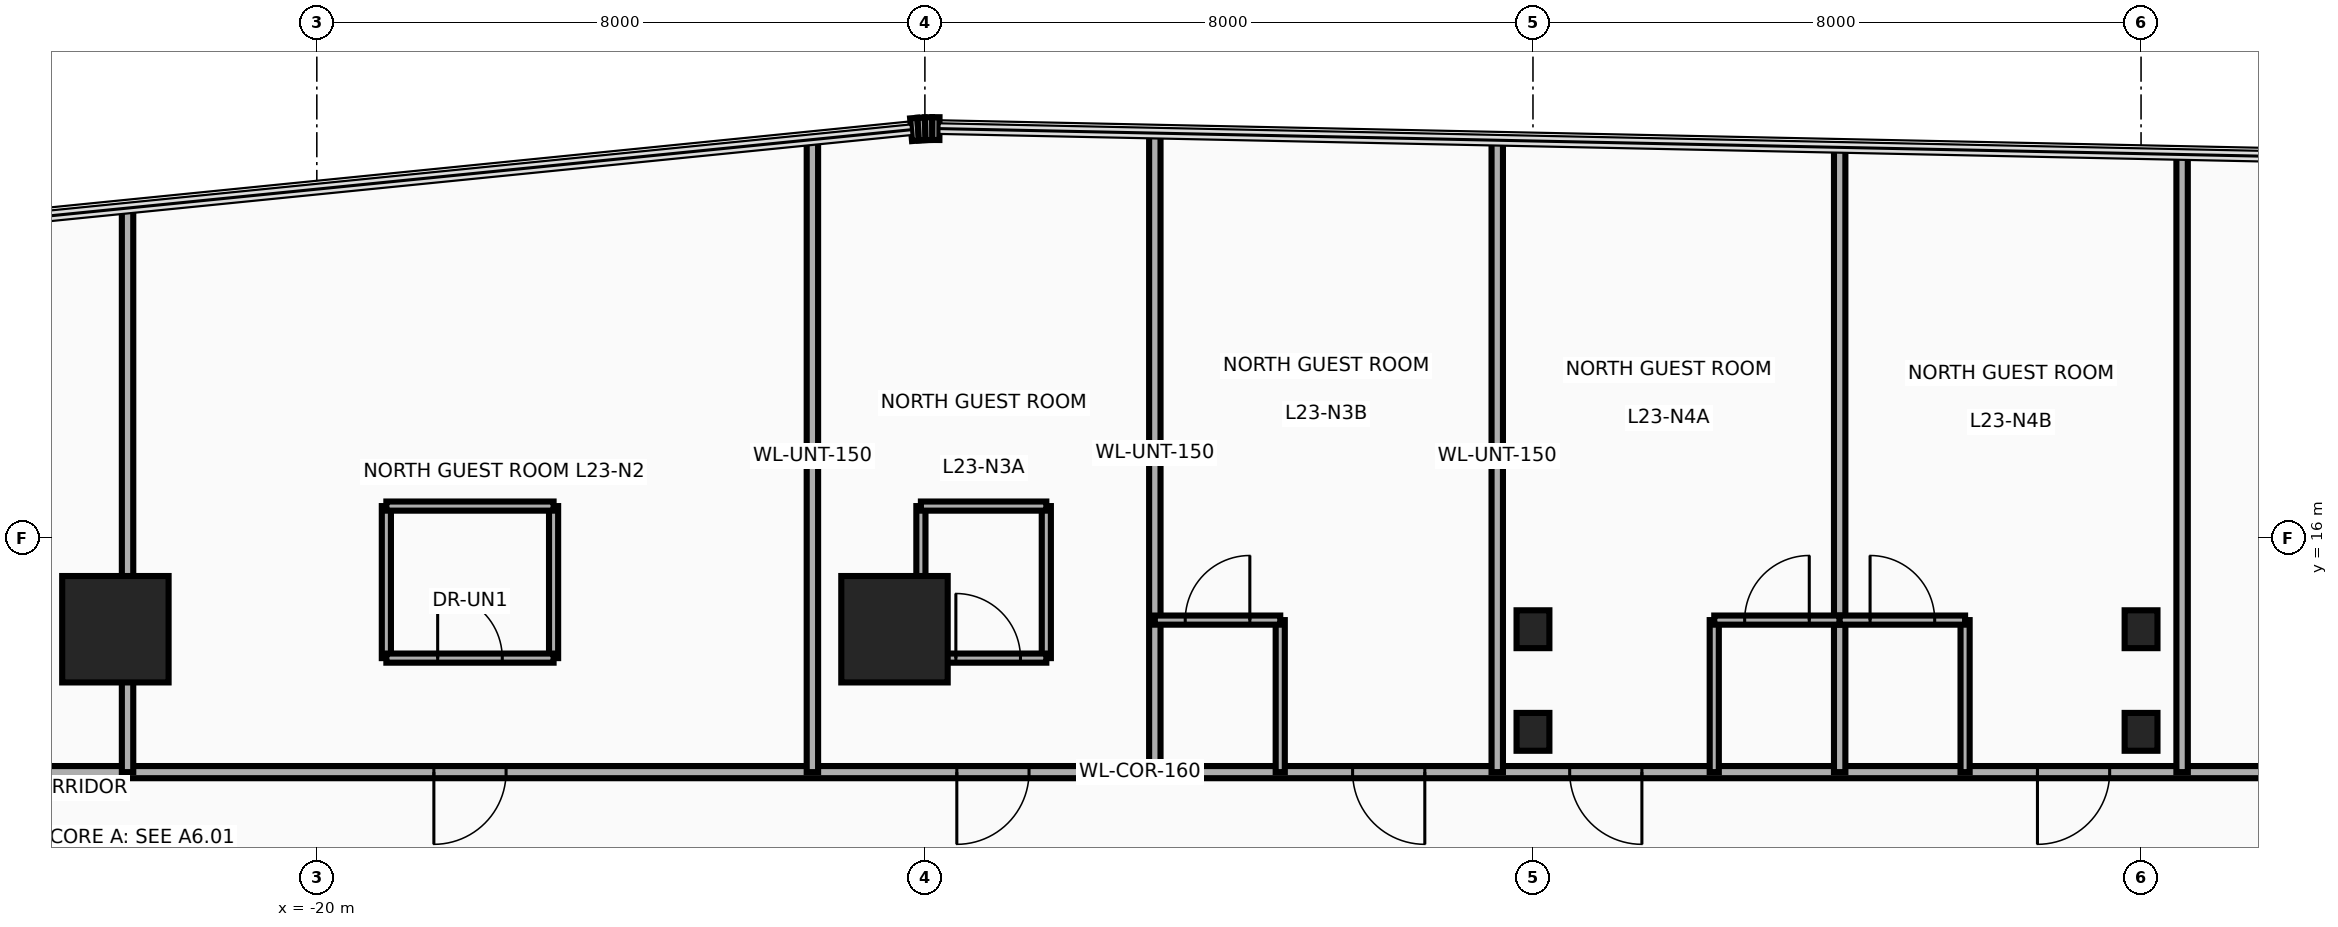
"""IFC4 building model, lengths in metres.
Left out: names, types, materials, properties, quantities, classifications, styles, units other than length and angle.
Written with IfcOpenShell. Run it as: python <this file> out.ifc"""

import sys

from ifc_helpers import new_model, si_unit, direction, frame, frame_2d, origin, origin_2d, place, context, subcontext, project, spatial, rectangle, i_section, extrude, source, transform, mapped, element, fill, save


model = new_model("IFC4")
c1 = context("Model", 3, precision=1e-05, world=origin(), true_north=direction((0.0, 1.0)))
c2 = subcontext(c1, "Body", "Model", "MODEL_VIEW")
j1 = project(units=[si_unit("LENGTHUNIT", "METRE"), si_unit("PLANEANGLEUNIT", "RADIAN")], contexts=[c1])
p1 = place(None, origin())
s1 = spatial("IfcSite", under=j1, at=p1, CompositionType="ELEMENT")
p2 = place(p1, origin())
s2 = spatial("IfcBuilding", under=s1, at=p2, CompositionType="ELEMENT")
p3 = place(p2, frame((0.0, 0.0, 92.6)))
s3 = spatial("IfcBuildingStorey", under=s2, at=p3, CompositionType="ELEMENT", Elevation=92.6)
m1 = source(origin(), c2, "Body", "SweptSolid", [
    extrude(rectangle(XDim=1.4, YDim=1.4, at=origin_2d()), origin(), (0.0, 0.0, 1.0), 3.7),
])
for number, where, z_axis, x_axis in (
    (1, (-22.65, 14.8, 0.0), (0.0, 0.0, 1.0), (1.0, 0.0, 0.0)),
    (2, (-12.4, 14.8, 0.0), (0.0, 0.0, 1.0), (1.0, 0.0, 0.0)),
):
    element("IfcColumn", number, at=place(p3, frame(where, z_axis=z_axis, x_axis=x_axis)), inside=s3, PredefinedType="COLUMN", context=c2, shape_type="MappedRepresentation", body=[
        mapped(m1, transform((0.0, 0.0, 0.0), x_axis=(1.0, 0.0, 0.0), y_axis=(0.0, 1.0, 0.0), z_axis=(0.0, 0.0, 1.0), scale=1.0)),
    ])
m2 = source(origin(), c2, "Body", "SweptSolid", [
    extrude(i_section(OverallWidth=0.432, OverallDepth=0.498, WebThickness=0.056, FlangeThickness=0.089, at=origin_2d()), origin(), (0.0, 0.0, 1.0), 3.7),
])
for number, where, z_axis, x_axis in (
    (3, (-4.0, 13.45, 0.0), (0.0, 0.0, 1.0), (1.0, 0.0, 0.0)),
    (4, (-4.0, 14.8, 0.0), (0.0, 0.0, 1.0), (1.0, 0.0, 0.0)),
    (5, (4.0, 13.45, 0.0), (0.0, 0.0, 1.0), (1.0, 0.0, 0.0)),
    (6, (4.0, 14.8, 0.0), (0.0, 0.0, 1.0), (1.0, 0.0, 0.0)),
):
    element("IfcColumn", number, at=place(p3, frame(where, z_axis=z_axis, x_axis=x_axis)), inside=s3, PredefinedType="COLUMN", context=c2, shape_type="MappedRepresentation", body=[
        mapped(m2, transform((0.0, 0.0, 0.0), x_axis=(1.0, 0.0, 0.0), y_axis=(0.0, 1.0, 0.0), z_axis=(0.0, 0.0, 1.0), scale=1.0)),
    ])
p4 = place(p3, frame((-12.182, 21.371, 0.0), z_axis=(0.0, 0.0, 1.0), x_axis=(0.996527790842, 0.08326080759, 0.0)))
e7 = element("IfcWall", 7, at=p4, inside=s3, PredefinedType="SOLIDWALL", context=c2, shape_type="SweptSolid", body=[
    extrude(rectangle(XDim=0.094, YDim=0.3, at=frame_2d((0.047, 0.0))), origin(), (0.0, 0.0, 1.0), 3.46),
])
p5 = place(p3, frame((-12.088, 21.379, 0.0), z_axis=(0.0, 0.0, 1.0), x_axis=(0.998476480444, 0.055178963393, 0.0)))
e8 = element("IfcWall", 8, at=p5, inside=s3, PredefinedType="SOLIDWALL", context=c2, shape_type="SweptSolid", body=[
    extrude(rectangle(XDim=0.093, YDim=0.3, at=frame_2d((0.046, 0.0))), origin(), (0.0, 0.0, 1.0), 3.46),
])
p6 = place(p3, frame((-11.996, 21.384, 0.0), z_axis=(0.0, 0.0, 1.0), x_axis=(0.999722573757, 0.023553673204, 0.0)))
e9 = element("IfcWall", 9, at=p6, inside=s3, PredefinedType="SOLIDWALL", context=c2, shape_type="SweptSolid", body=[
    extrude(rectangle(XDim=0.093, YDim=0.3, at=frame_2d((0.047, 0.0))), origin(), (0.0, 0.0, 1.0), 3.46),
])
p7 = place(p3, frame((-11.902, 21.386, 0.0), z_axis=(0.0, 0.0, 1.0), x_axis=(0.999986507273, -0.005194735103, 0.0)))
e10 = element("IfcWall", 10, at=p7, inside=s3, PredefinedType="SOLIDWALL", context=c2, shape_type="SweptSolid", body=[
    extrude(rectangle(XDim=0.094, YDim=0.3, at=frame_2d((0.047, 0.0))), origin(), (0.0, 0.0, 1.0), 3.46),
])
p8 = place(p3, frame((-31.89, 12.92, 0.0), z_axis=(0.0, 0.0, 1.0), x_axis=(1.0, 0.0, 0.0)))
e11 = element("IfcWall", 11, at=p8, inside=s3, PredefinedType="PARTITIONING", context=c2, shape_type="SweptSolid", body=[
    extrude(rectangle(XDim=45.44, YDim=0.16, at=frame_2d((22.72, 0.0))), origin(), (0.0, 0.0, 1.0), 2.583),
])
p9 = place(p8, frame((4.225, 0.0, 0.0)))
e12 = element("IfcOpeningElement", 12, at=p9, cuts=e11, PredefinedType="OPENING", context=c2, shape_type="SweptSolid", body=[
    extrude(rectangle(XDim=0.95, YDim=2.15, at=frame_2d((0.475, 1.075))), frame((0.0, 0.095, 0.0), z_axis=(0.0, -1.0, 0.0), x_axis=(1.0, 0.0, 0.0)), (0.0, 0.0, 1.0), 0.19),
])
p10 = place(p8, frame((13.43, 0.0, 0.0)))
e13 = element("IfcOpeningElement", 13, at=p10, cuts=e11, PredefinedType="OPENING", context=c2, shape_type="SweptSolid", body=[
    extrude(rectangle(XDim=0.95, YDim=2.15, at=frame_2d((0.475, 1.075))), frame((0.0, 0.095, 0.0), z_axis=(0.0, -1.0, 0.0), x_axis=(1.0, 0.0, 0.0)), (0.0, 0.0, 1.0), 0.19),
])
p11 = place(p8, frame((20.31, 0.0, 0.0)))
e14 = element("IfcOpeningElement", 14, at=p11, cuts=e11, PredefinedType="OPENING", context=c2, shape_type="SweptSolid", body=[
    extrude(rectangle(XDim=0.95, YDim=2.15, at=frame_2d((0.475, 1.075))), frame((0.0, 0.095, 0.0), z_axis=(0.0, -1.0, 0.0), x_axis=(1.0, 0.0, 0.0)), (0.0, 0.0, 1.0), 0.19),
])
p12 = place(p8, frame((25.517, 0.0, 0.0)))
e15 = element("IfcOpeningElement", 15, at=p12, cuts=e11, PredefinedType="OPENING", context=c2, shape_type="SweptSolid", body=[
    extrude(rectangle(XDim=0.95, YDim=2.15, at=frame_2d((0.475, 1.075))), frame((0.0, 0.095, 0.0), z_axis=(0.0, -1.0, 0.0), x_axis=(1.0, 0.0, 0.0)), (0.0, 0.0, 1.0), 0.19),
])
p13 = place(p8, frame((28.373, 0.0, 0.0)))
e16 = element("IfcOpeningElement", 16, at=p13, cuts=e11, PredefinedType="OPENING", context=c2, shape_type="SweptSolid", body=[
    extrude(rectangle(XDim=0.95, YDim=2.15, at=frame_2d((0.475, 1.075))), frame((0.0, 0.095, 0.0), z_axis=(0.0, -1.0, 0.0), x_axis=(1.0, 0.0, 0.0)), (0.0, 0.0, 1.0), 0.19),
])
p14 = place(p8, frame((34.527, 0.0, 0.0)))
e17 = element("IfcOpeningElement", 17, at=p14, cuts=e11, PredefinedType="OPENING", context=c2, shape_type="SweptSolid", body=[
    extrude(rectangle(XDim=0.95, YDim=2.15, at=frame_2d((0.475, 1.075))), frame((0.0, 0.095, 0.0), z_axis=(0.0, -1.0, 0.0), x_axis=(1.0, 0.0, 0.0)), (0.0, 0.0, 1.0), 0.19),
])
p15 = place(p8, frame((39.36, 0.0, 0.0)))
e18 = element("IfcOpeningElement", 18, at=p15, cuts=e11, PredefinedType="OPENING", context=c2, shape_type="SweptSolid", body=[
    extrude(rectangle(XDim=0.95, YDim=2.15, at=frame_2d((0.475, 1.075))), frame((0.0, 0.095, 0.0), z_axis=(0.0, -1.0, 0.0), x_axis=(1.0, 0.0, 0.0)), (0.0, 0.0, 1.0), 0.19),
])
p16 = place(p3, frame((-22.49, 12.92, 0.0), z_axis=(0.0, 0.0, 1.0), x_axis=(0.0, 1.0, 0.0)))
e19 = element("IfcWall", 19, at=p16, inside=s3, PredefinedType="PARTITIONING", context=c2, shape_type="SweptSolid", body=[
    extrude(rectangle(XDim=7.421, YDim=0.15, at=frame_2d((3.71, 0.0))), origin(), (0.0, 0.0, 1.0), 2.583),
])
p17 = place(p3, frame((-13.48, 12.92, 0.0), z_axis=(0.0, 0.0, 1.0), x_axis=(0.0, 1.0, 0.0)))
e20 = element("IfcWall", 20, at=p17, inside=s3, PredefinedType="PARTITIONING", context=c2, shape_type="SweptSolid", body=[
    extrude(rectangle(XDim=8.322, YDim=0.15, at=frame_2d((4.161, 0.0))), origin(), (0.0, 0.0, 1.0), 2.583),
])
p18 = place(p3, frame((-4.47, 12.92, 0.0), z_axis=(0.0, 0.0, 1.0), x_axis=(0.0, 1.0, 0.0)))
e21 = element("IfcWall", 21, at=p18, inside=s3, PredefinedType="PARTITIONING", context=c2, shape_type="SweptSolid", body=[
    extrude(rectangle(XDim=8.313, YDim=0.15, at=frame_2d((4.157, 0.0))), origin(), (0.0, 0.0, 1.0), 2.583),
])
p19 = place(p3, frame((4.54, 12.92, 0.0), z_axis=(0.0, 0.0, 1.0), x_axis=(0.0, 1.0, 0.0)))
e22 = element("IfcWall", 22, at=p19, inside=s3, PredefinedType="PARTITIONING", context=c2, shape_type="SweptSolid", body=[
    extrude(rectangle(XDim=8.125, YDim=0.15, at=frame_2d((4.063, 0.0))), origin(), (0.0, 0.0, 1.0), 2.583),
])
for number, where, z_axis, x_axis in (
    (23, (-19.085, 14.42, 0.0), (0.0, 0.0, 1.0), (0.0, 1.0, 0.0)),
    (24, (-16.885, 14.42, 0.0), (0.0, 0.0, 1.0), (0.0, 1.0, 0.0)),
):
    element("IfcWall", number, at=place(p3, frame(where, z_axis=z_axis, x_axis=x_axis)), inside=s3, PredefinedType="PARTITIONING", context=c2, shape_type="SweptSolid", body=[
        extrude(rectangle(XDim=2.0, YDim=0.12, at=frame_2d((1.0, 0.0))), origin(), (0.0, 0.0, 1.0), 2.583),
    ])
p20 = place(p3, frame((-19.085, 16.42, 0.0), z_axis=(0.0, 0.0, 1.0), x_axis=(1.0, 0.0, 0.0)))
e25 = element("IfcWall", 25, at=p20, inside=s3, PredefinedType="PARTITIONING", context=c2, shape_type="SweptSolid", body=[
    extrude(rectangle(XDim=2.2, YDim=0.12, at=frame_2d((1.1, 0.0))), origin(), (0.0, 0.0, 1.0), 3.46),
])
p21 = place(p3, frame((-19.085, 14.42, 0.0), z_axis=(0.0, 0.0, 1.0), x_axis=(1.0, 0.0, 0.0)))
e26 = element("IfcWall", 26, at=p21, inside=s3, PredefinedType="PARTITIONING", context=c2, shape_type="SweptSolid", body=[
    extrude(rectangle(XDim=2.2, YDim=0.12, at=frame_2d((1.1, 0.0))), origin(), (0.0, 0.0, 1.0), 3.46),
])
p22 = place(p21, frame((0.675, 0.0, 0.0)))
e27 = element("IfcOpeningElement", 27, at=p22, cuts=e26, PredefinedType="OPENING", context=c2, shape_type="SweptSolid", body=[
    extrude(rectangle(XDim=0.85, YDim=2.1, at=frame_2d((0.425, 1.05))), frame((0.0, 0.075, 0.0), z_axis=(0.0, -1.0, 0.0), x_axis=(1.0, 0.0, 0.0)), (0.0, 0.0, 1.0), 0.15),
])
p23 = place(p3, frame((-8.975, 12.92, 0.0), z_axis=(0.0, 0.0, 1.0), x_axis=(0.0, 1.0, 0.0)))
e28 = element("IfcWall", 28, at=p23, inside=s3, PredefinedType="PARTITIONING", context=c2, shape_type="SweptSolid", body=[
    extrude(rectangle(XDim=8.407, YDim=0.15, at=frame_2d((4.204, 0.0))), origin(), (0.0, 0.0, 1.0), 2.583),
])
for number, where, z_axis, x_axis in (
    (29, (-12.052, 14.42, 0.0), (0.0, 0.0, 1.0), (0.0, 1.0, 0.0)),
    (30, (-10.403, 14.42, 0.0), (0.0, 0.0, 1.0), (0.0, 1.0, 0.0)),
):
    element("IfcWall", number, at=place(p3, frame(where, z_axis=z_axis, x_axis=x_axis)), inside=s3, PredefinedType="PARTITIONING", context=c2, shape_type="SweptSolid", body=[
        extrude(rectangle(XDim=2.0, YDim=0.12, at=frame_2d((1.0, 0.0))), origin(), (0.0, 0.0, 1.0), 2.583),
    ])
p24 = place(p3, frame((-12.052, 16.42, 0.0), z_axis=(0.0, 0.0, 1.0), x_axis=(1.0, 0.0, 0.0)))
e31 = element("IfcWall", 31, at=p24, inside=s3, PredefinedType="PARTITIONING", context=c2, shape_type="SweptSolid", body=[
    extrude(rectangle(XDim=1.65, YDim=0.12, at=frame_2d((0.825, 0.0))), origin(), (0.0, 0.0, 1.0), 3.46),
])
p25 = place(p3, frame((-12.052, 14.42, 0.0), z_axis=(0.0, 0.0, 1.0), x_axis=(1.0, 0.0, 0.0)))
e32 = element("IfcWall", 32, at=p25, inside=s3, PredefinedType="PARTITIONING", context=c2, shape_type="SweptSolid", body=[
    extrude(rectangle(XDim=1.65, YDim=0.12, at=frame_2d((0.825, 0.0))), origin(), (0.0, 0.0, 1.0), 3.46),
])
p26 = place(p25, frame((0.46, 0.0, 0.0)))
e33 = element("IfcOpeningElement", 33, at=p26, cuts=e32, PredefinedType="OPENING", context=c2, shape_type="SweptSolid", body=[
    extrude(rectangle(XDim=0.85, YDim=2.1, at=frame_2d((0.425, 1.05))), frame((0.0, 0.075, 0.0), z_axis=(0.0, -1.0, 0.0), x_axis=(1.0, 0.0, 0.0)), (0.0, 0.0, 1.0), 0.15),
])
p27 = place(p3, frame((-7.325, 12.92, 0.0), z_axis=(0.0, 0.0, 1.0), x_axis=(0.0, 1.0, 0.0)))
e34 = element("IfcWall", 34, at=p27, inside=s3, PredefinedType="PARTITIONING", context=c2, shape_type="SweptSolid", body=[
    extrude(rectangle(XDim=2.0, YDim=0.12, at=frame_2d((1.0, 0.0))), origin(), (0.0, 0.0, 1.0), 2.583),
])
p28 = place(p3, frame((-8.975, 14.92, 0.0), z_axis=(0.0, 0.0, 1.0), x_axis=(1.0, 0.0, 0.0)))
e35 = element("IfcWall", 35, at=p28, inside=s3, PredefinedType="PARTITIONING", context=c2, shape_type="SweptSolid", body=[
    extrude(rectangle(XDim=1.65, YDim=0.12, at=frame_2d((0.825, 0.0))), origin(), (0.0, 0.0, 1.0), 2.583),
])
p29 = place(p28, frame((0.4, 0.0, 0.0)))
e36 = element("IfcOpeningElement", 36, at=p29, cuts=e35, PredefinedType="OPENING", context=c2, shape_type="SweptSolid", body=[
    extrude(rectangle(XDim=0.85, YDim=2.1, at=frame_2d((0.425, 1.05))), frame((0.0, 0.075, 0.0), z_axis=(0.0, -1.0, 0.0), x_axis=(1.0, 0.0, 0.0)), (0.0, 0.0, 1.0), 0.15),
])
p30 = place(p3, frame((0.035, 12.92, 0.0), z_axis=(0.0, 0.0, 1.0), x_axis=(0.0, 1.0, 0.0)))
e37 = element("IfcWall", 37, at=p30, inside=s3, PredefinedType="PARTITIONING", context=c2, shape_type="SweptSolid", body=[
    extrude(rectangle(XDim=8.219, YDim=0.15, at=frame_2d((4.11, 0.0))), origin(), (0.0, 0.0, 1.0), 2.583),
])
p31 = place(p3, frame((-1.615, 12.92, 0.0), z_axis=(0.0, 0.0, 1.0), x_axis=(0.0, 1.0, 0.0)))
e38 = element("IfcWall", 38, at=p31, inside=s3, PredefinedType="PARTITIONING", context=c2, shape_type="SweptSolid", body=[
    extrude(rectangle(XDim=2.0, YDim=0.12, at=frame_2d((1.0, 0.0))), origin(), (0.0, 0.0, 1.0), 2.583),
])
p32 = place(p3, frame((-1.615, 14.92, 0.0), z_axis=(0.0, 0.0, 1.0), x_axis=(1.0, 0.0, 0.0)))
e39 = element("IfcWall", 39, at=p32, inside=s3, PredefinedType="PARTITIONING", context=c2, shape_type="SweptSolid", body=[
    extrude(rectangle(XDim=1.65, YDim=0.12, at=frame_2d((0.825, 0.0))), origin(), (0.0, 0.0, 1.0), 2.583),
])
p33 = place(p32, frame((0.4, 0.0, 0.0)))
e40 = element("IfcOpeningElement", 40, at=p33, cuts=e39, PredefinedType="OPENING", context=c2, shape_type="SweptSolid", body=[
    extrude(rectangle(XDim=0.85, YDim=2.1, at=frame_2d((0.425, 1.05))), frame((0.0, 0.075, 0.0), z_axis=(0.0, -1.0, 0.0), x_axis=(1.0, 0.0, 0.0)), (0.0, 0.0, 1.0), 0.15),
])
p34 = place(p3, frame((1.685, 12.92, 0.0), z_axis=(0.0, 0.0, 1.0), x_axis=(0.0, 1.0, 0.0)))
e41 = element("IfcWall", 41, at=p34, inside=s3, PredefinedType="PARTITIONING", context=c2, shape_type="SweptSolid", body=[
    extrude(rectangle(XDim=2.0, YDim=0.12, at=frame_2d((1.0, 0.0))), origin(), (0.0, 0.0, 1.0), 2.583),
])
p35 = place(p3, frame((0.035, 14.92, 0.0), z_axis=(0.0, 0.0, 1.0), x_axis=(1.0, 0.0, 0.0)))
e42 = element("IfcWall", 42, at=p35, inside=s3, PredefinedType="PARTITIONING", context=c2, shape_type="SweptSolid", body=[
    extrude(rectangle(XDim=1.65, YDim=0.12, at=frame_2d((0.825, 0.0))), origin(), (0.0, 0.0, 1.0), 2.583),
])
p36 = place(p35, frame((0.4, 0.0, 0.0)))
e43 = element("IfcOpeningElement", 43, at=p36, cuts=e42, PredefinedType="OPENING", context=c2, shape_type="SweptSolid", body=[
    extrude(rectangle(XDim=0.85, YDim=2.1, at=frame_2d((0.425, 1.05))), frame((0.0, 0.075, 0.0), z_axis=(0.0, -1.0, 0.0), x_axis=(1.0, 0.0, 0.0)), (0.0, 0.0, 1.0), 0.15),
])
p37 = place(p10, frame((0.95, 0.0, 0.0), z_axis=(0.0, 0.0, 1.0), x_axis=(-1.0, 0.0, 0.0)))
e44 = element("IfcDoor", 44, at=p37, inside=s3, OperationType="SINGLE_SWING_LEFT", PredefinedType="DOOR", context=c2, shape_type="SweptSolid", body=[
    extrude(rectangle(XDim=0.95, YDim=2.15, at=frame_2d((0.475, 1.075))), frame((0.0, 0.025, 0.0), z_axis=(0.0, -1.0, 0.0), x_axis=(1.0, 0.0, 0.0)), (0.0, 0.0, 1.0), 0.05),
])
fill(e13, e44)
p38 = place(p22, origin())
e45 = element("IfcDoor", 45, at=p38, inside=s3, OperationType="SINGLE_SWING_RIGHT", PredefinedType="DOOR", context=c2, shape_type="SweptSolid", body=[
    extrude(rectangle(XDim=0.85, YDim=2.1, at=frame_2d((0.425, 1.05))), frame((0.0, 0.025, 0.0), z_axis=(0.0, -1.0, 0.0), x_axis=(1.0, 0.0, 0.0)), (0.0, 0.0, 1.0), 0.05),
])
fill(e27, e45)
p39 = place(p11, frame((0.95, 0.0, 0.0), z_axis=(0.0, 0.0, 1.0), x_axis=(-1.0, 0.0, 0.0)))
e46 = element("IfcDoor", 46, at=p39, inside=s3, OperationType="SINGLE_SWING_LEFT", PredefinedType="DOOR", context=c2, shape_type="SweptSolid", body=[
    extrude(rectangle(XDim=0.95, YDim=2.15, at=frame_2d((0.475, 1.075))), frame((0.0, 0.025, 0.0), z_axis=(0.0, -1.0, 0.0), x_axis=(1.0, 0.0, 0.0)), (0.0, 0.0, 1.0), 0.05),
])
fill(e14, e46)
p40 = place(p26, origin())
e47 = element("IfcDoor", 47, at=p40, inside=s3, OperationType="SINGLE_SWING_RIGHT", PredefinedType="DOOR", context=c2, shape_type="SweptSolid", body=[
    extrude(rectangle(XDim=0.85, YDim=2.1, at=frame_2d((0.425, 1.05))), frame((0.0, 0.025, 0.0), z_axis=(0.0, -1.0, 0.0), x_axis=(1.0, 0.0, 0.0)), (0.0, 0.0, 1.0), 0.05),
])
fill(e33, e47)
p41 = place(p12, frame((0.95, 0.0, 0.0), z_axis=(0.0, 0.0, 1.0), x_axis=(-1.0, 0.0, 0.0)))
e48 = element("IfcDoor", 48, at=p41, inside=s3, OperationType="SINGLE_SWING_LEFT", PredefinedType="DOOR", context=c2, shape_type="SweptSolid", body=[
    extrude(rectangle(XDim=0.95, YDim=2.15, at=frame_2d((0.475, 1.075))), frame((0.0, 0.025, 0.0), z_axis=(0.0, -1.0, 0.0), x_axis=(1.0, 0.0, 0.0)), (0.0, 0.0, 1.0), 0.05),
])
fill(e15, e48)
p42 = place(p29, origin())
e49 = element("IfcDoor", 49, at=p42, inside=s3, OperationType="SINGLE_SWING_RIGHT", PredefinedType="DOOR", context=c2, shape_type="SweptSolid", body=[
    extrude(rectangle(XDim=0.85, YDim=2.1, at=frame_2d((0.425, 1.05))), frame((0.0, 0.025, 0.0), z_axis=(0.0, -1.0, 0.0), x_axis=(1.0, 0.0, 0.0)), (0.0, 0.0, 1.0), 0.05),
])
fill(e36, e49)
p43 = place(p13, frame((0.95, 0.0, 0.0), z_axis=(0.0, 0.0, 1.0), x_axis=(-1.0, 0.0, 0.0)))
e50 = element("IfcDoor", 50, at=p43, inside=s3, OperationType="SINGLE_SWING_LEFT", PredefinedType="DOOR", context=c2, shape_type="SweptSolid", body=[
    extrude(rectangle(XDim=0.95, YDim=2.15, at=frame_2d((0.475, 1.075))), frame((0.0, 0.025, 0.0), z_axis=(0.0, -1.0, 0.0), x_axis=(1.0, 0.0, 0.0)), (0.0, 0.0, 1.0), 0.05),
])
fill(e16, e50)
p44 = place(p33, origin())
e51 = element("IfcDoor", 51, at=p44, inside=s3, OperationType="SINGLE_SWING_RIGHT", PredefinedType="DOOR", context=c2, shape_type="SweptSolid", body=[
    extrude(rectangle(XDim=0.85, YDim=2.1, at=frame_2d((0.425, 1.05))), frame((0.0, 0.025, 0.0), z_axis=(0.0, -1.0, 0.0), x_axis=(1.0, 0.0, 0.0)), (0.0, 0.0, 1.0), 0.05),
])
fill(e40, e51)
p45 = place(p14, frame((0.95, 0.0, 0.0), z_axis=(0.0, 0.0, 1.0), x_axis=(-1.0, 0.0, 0.0)))
e52 = element("IfcDoor", 52, at=p45, inside=s3, OperationType="SINGLE_SWING_LEFT", PredefinedType="DOOR", context=c2, shape_type="SweptSolid", body=[
    extrude(rectangle(XDim=0.95, YDim=2.15, at=frame_2d((0.475, 1.075))), frame((0.0, 0.025, 0.0), z_axis=(0.0, -1.0, 0.0), x_axis=(1.0, 0.0, 0.0)), (0.0, 0.0, 1.0), 0.05),
])
fill(e17, e52)
p46 = place(p36, origin())
e53 = element("IfcDoor", 53, at=p46, inside=s3, OperationType="SINGLE_SWING_RIGHT", PredefinedType="DOOR", context=c2, shape_type="SweptSolid", body=[
    extrude(rectangle(XDim=0.85, YDim=2.1, at=frame_2d((0.425, 1.05))), frame((0.0, 0.025, 0.0), z_axis=(0.0, -1.0, 0.0), x_axis=(1.0, 0.0, 0.0)), (0.0, 0.0, 1.0), 0.05),
])
fill(e43, e53)
save(model, sys.argv[1])
